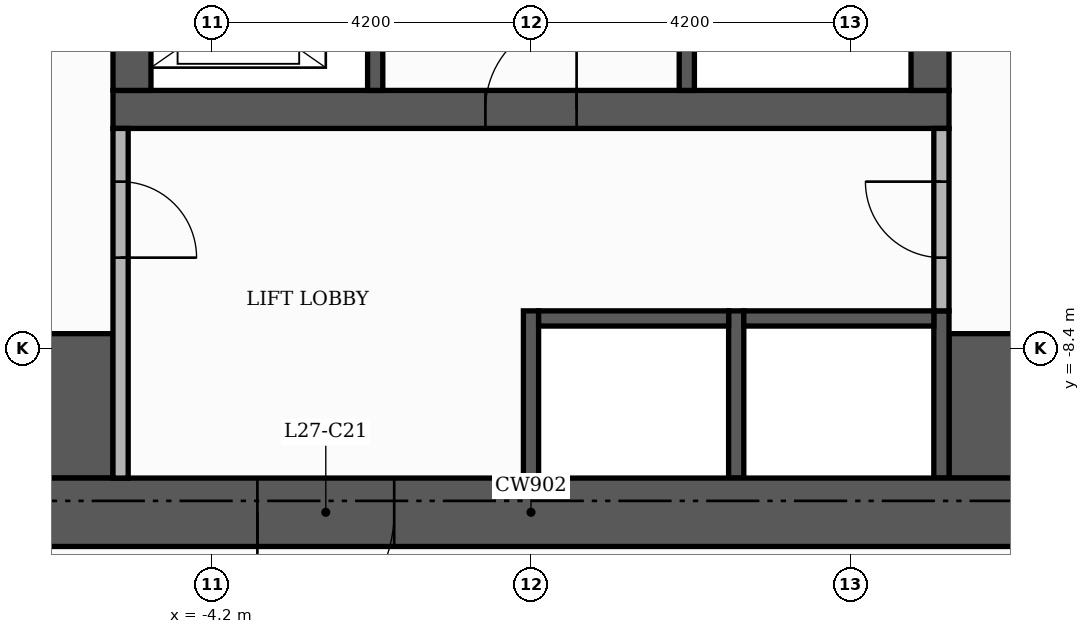
"""IFC4 building model, lengths in metres.
Left out: names, types, materials, properties, quantities, classifications, styles, units other than length and angle.
Written with IfcOpenShell. Run it as: python <this file> out.ifc"""

import sys

from ifc_helpers import new_model, si_unit, direction, frame, frame_2d, origin, place, context, subcontext, project, spatial, rectangle, extrude, element, fill, save


model = new_model("IFC4")
c1 = context("Model", 3, precision=1e-05, world=origin(), true_north=direction((0.0, 1.0)))
c2 = subcontext(c1, "Body", "Model", "MODEL_VIEW")
j1 = project(units=[si_unit("LENGTHUNIT", "METRE"), si_unit("PLANEANGLEUNIT", "RADIAN")], contexts=[c1])
p1 = place(None, origin())
s1 = spatial("IfcSite", under=j1, at=p1, CompositionType="ELEMENT")
p2 = place(p1, origin())
s2 = spatial("IfcBuilding", under=s1, at=p2, CompositionType="ELEMENT")
p3 = place(p2, frame((0.0, 0.0, 114.3)))
s3 = spatial("IfcBuildingStorey", under=s2, at=p3, CompositionType="ELEMENT", Elevation=114.3)
p4 = place(p3, frame((-5.5, -5.25, 0.0), z_axis=(0.0, 0.0, 1.0), x_axis=(1.0, 0.0, 0.0)))
e1 = element("IfcWall", 1, at=p4, inside=s3, PredefinedType="SHEAR", context=c2, shape_type="SweptSolid", body=[
    extrude(rectangle(XDim=11.0, YDim=0.5, at=frame_2d((5.5, 0.0))), origin(), (0.0, 0.0, 1.0), 3.48),
])
p5 = place(p4, frame((4.9, 0.0, 0.0)))
e2 = element("IfcOpeningElement", 2, at=p5, cuts=e1, PredefinedType="OPENING", context=c2, shape_type="SweptSolid", body=[
    extrude(rectangle(XDim=1.2, YDim=2.1, at=frame_2d((0.6, 1.05))), frame((0.0, 0.26, 0.0), z_axis=(0.0, -1.0, 0.0), x_axis=(1.0, 0.0, 0.0)), (0.0, 0.0, 1.0), 0.52),
])
for number, where, z_axis, x_axis in (
    (3, (-5.25, -5.0, 0.0), (0.0, 0.0, 1.0), (0.0, 1.0, 0.0)),
    (4, (5.25, -5.0, 0.0), (0.0, 0.0, 1.0), (0.0, 1.0, 0.0)),
):
    element("IfcWall", number, at=place(p3, frame(where, z_axis=z_axis, x_axis=x_axis)), inside=s3, PredefinedType="SHEAR", context=c2, shape_type="SweptSolid", body=[
        extrude(rectangle(XDim=10.5, YDim=0.5, at=frame_2d((5.25, 0.0))), origin(), (0.0, 0.0, 1.0), 3.48),
    ])
for number, where, z_axis, x_axis in (
    (5, (-10.1, -9.15, 0.0), (0.0, 0.0, 1.0), (1.0, 0.0, 0.0)),
    (6, (5.5, -9.15, 0.0), (0.0, 0.0, 1.0), (1.0, 0.0, 0.0)),
):
    element("IfcWall", number, at=place(p3, frame(where, z_axis=z_axis, x_axis=x_axis)), inside=s3, PredefinedType="SHEAR", context=c2, shape_type="SweptSolid", body=[
        extrude(rectangle(XDim=4.6, YDim=1.9, at=frame_2d((2.3, 0.0))), origin(), (0.0, 0.0, 1.0), 3.48),
    ])
p6 = place(p3, frame((2.05, -5.0, 0.0), z_axis=(0.0, 0.0, 1.0), x_axis=(0.0, 1.0, 0.0)))
e7 = element("IfcWall", 7, at=p6, inside=s3, PredefinedType="SHEAR", context=c2, shape_type="SweptSolid", body=[
    extrude(rectangle(XDim=6.6, YDim=0.2, at=frame_2d((3.3, 0.0))), origin(), (0.0, 0.0, 1.0), 3.48),
])
p7 = place(p6, frame((5.25, 0.0, 0.0)))
e8 = element("IfcOpeningElement", 8, at=p7, cuts=e7, PredefinedType="OPENING", context=c2, shape_type="SweptSolid", body=[
    extrude(rectangle(XDim=1.0, YDim=2.1, at=frame_2d((0.5, 1.05))), frame((0.0, 0.11, 0.0), z_axis=(0.0, -1.0, 0.0), x_axis=(1.0, 0.0, 0.0)), (0.0, 0.0, 1.0), 0.22),
])
for number, where, z_axis, x_axis in (
    (9, (0.0, -10.1, 0.0), (0.0, 0.0, 1.0), (0.0, 1.0, 0.0)),
    (10, (2.7, -10.1, 0.0), (0.0, 0.0, 1.0), (0.0, 1.0, 0.0)),
    (11, (5.4, -10.1, 0.0), (0.0, 0.0, 1.0), (0.0, 1.0, 0.0)),
):
    element("IfcWall", number, at=place(p3, frame(where, z_axis=z_axis, x_axis=x_axis)), inside=s3, PredefinedType="SHEAR", context=c2, shape_type="SweptSolid", body=[
        extrude(rectangle(XDim=2.2, YDim=0.2, at=frame_2d((1.1, 0.0))), origin(), (0.0, 0.0, 1.0), 3.48),
    ])
for number, where, z_axis, x_axis in (
    (12, (0.1, -8.0, 0.0), (0.0, 0.0, 1.0), (1.0, 0.0, 0.0)),
    (13, (2.8, -8.0, 0.0), (0.0, 0.0, 1.0), (1.0, 0.0, 0.0)),
):
    element("IfcWall", number, at=place(p3, frame(where, z_axis=z_axis, x_axis=x_axis)), inside=s3, PredefinedType="SHEAR", context=c2, shape_type="SweptSolid", body=[
        extrude(rectangle(XDim=2.5, YDim=0.2, at=frame_2d((1.25, 0.0))), origin(), (0.0, 0.0, 1.0), 3.48),
    ])
p8 = place(p3, frame((-2.05, -5.0, 0.0), z_axis=(0.0, 0.0, 1.0), x_axis=(0.0, 1.0, 0.0)))
e14 = element("IfcWall", 14, at=p8, inside=s3, PredefinedType="SHEAR", context=c2, shape_type="SweptSolid", body=[
    extrude(rectangle(XDim=3.4, YDim=0.2, at=frame_2d((1.7, 0.0))), origin(), (0.0, 0.0, 1.0), 3.48),
])
p9 = place(p8, frame((0.55, 0.0, 0.0)))
e15 = element("IfcOpeningElement", 15, at=p9, cuts=e14, PredefinedType="OPENING", context=c2, shape_type="SweptSolid", body=[
    extrude(rectangle(XDim=1.1, YDim=2.1, at=frame_2d((0.55, 1.05))), frame((0.0, 0.11, 0.0), z_axis=(0.0, -1.0, 0.0), x_axis=(1.0, 0.0, 0.0)), (0.0, 0.0, 1.0), 0.22),
])
p10 = place(p8, frame((2.45, 0.0, 0.0)))
e16 = element("IfcOpeningElement", 16, at=p10, cuts=e14, PredefinedType="OPENING", context=c2, shape_type="SweptSolid", body=[
    extrude(rectangle(XDim=0.8, YDim=2.1, at=frame_2d((0.4, 1.05))), frame((0.0, 0.11, 0.0), z_axis=(0.0, -1.0, 0.0), x_axis=(1.0, 0.0, 0.0)), (0.0, 0.0, 1.0), 0.22),
])
p11 = place(p3, frame((-11.0, -10.55, 0.0), z_axis=(0.0, 0.0, 1.0), x_axis=(1.0, 0.0, 0.0)))
e17 = element("IfcWall", 17, at=p11, inside=s3, PredefinedType="SHEAR", context=c2, shape_type="SweptSolid", body=[
    extrude(rectangle(XDim=22.0, YDim=0.9, at=frame_2d((11.0, 0.0))), origin(), (0.0, 0.0, 1.0), 3.48),
])
p12 = place(p11, frame((7.4, 0.0, 0.0)))
e18 = element("IfcOpeningElement", 18, at=p12, cuts=e17, PredefinedType="OPENING", context=c2, shape_type="SweptSolid", body=[
    extrude(rectangle(XDim=1.8, YDim=2.2, at=frame_2d((0.9, 1.1))), frame((0.0, 0.46, 0.0), z_axis=(0.0, -1.0, 0.0), x_axis=(1.0, 0.0, 0.0)), (0.0, 0.0, 1.0), 0.92),
])
p13 = place(p3, frame((-5.4, -10.1, 0.0), z_axis=(0.0, 0.0, 1.0), x_axis=(0.0, 1.0, 0.0)))
e19 = element("IfcWall", 19, at=p13, inside=s3, PredefinedType="PARTITIONING", context=c2, shape_type="SweptSolid", body=[
    extrude(rectangle(XDim=4.6, YDim=0.2, at=frame_2d((2.3, 0.0))), origin(), (0.0, 0.0, 1.0), 3.48),
])
p14 = place(p13, frame((2.9, 0.0, 0.0)))
e20 = element("IfcOpeningElement", 20, at=p14, cuts=e19, PredefinedType="OPENING", context=c2, shape_type="SweptSolid", body=[
    extrude(rectangle(XDim=1.0, YDim=2.1, at=frame_2d((0.5, 1.05))), frame((0.0, 0.11, 0.0), z_axis=(0.0, -1.0, 0.0), x_axis=(1.0, 0.0, 0.0)), (0.0, 0.0, 1.0), 0.22),
])
p15 = place(p3, frame((5.4, -7.9, 0.0), z_axis=(0.0, 0.0, 1.0), x_axis=(0.0, 1.0, 0.0)))
e21 = element("IfcWall", 21, at=p15, inside=s3, PredefinedType="PARTITIONING", context=c2, shape_type="SweptSolid", body=[
    extrude(rectangle(XDim=2.4, YDim=0.2, at=frame_2d((1.2, 0.0))), origin(), (0.0, 0.0, 1.0), 3.48),
])
p16 = place(p15, frame((0.7, 0.0, 0.0)))
e22 = element("IfcOpeningElement", 22, at=p16, cuts=e21, PredefinedType="OPENING", context=c2, shape_type="SweptSolid", body=[
    extrude(rectangle(XDim=1.0, YDim=2.1, at=frame_2d((0.5, 1.05))), frame((0.0, 0.11, 0.0), z_axis=(0.0, -1.0, 0.0), x_axis=(1.0, 0.0, 0.0)), (0.0, 0.0, 1.0), 0.22),
])
p17 = place(p5, origin())
e23 = element("IfcDoor", 23, at=p17, inside=s3, OperationType="SINGLE_SWING_RIGHT", PredefinedType="DOOR", context=c2, shape_type="SweptSolid", body=[
    extrude(rectangle(XDim=1.2, YDim=2.1, at=frame_2d((0.6, 1.05))), frame((0.0, 0.025, 0.0), z_axis=(0.0, -1.0, 0.0), x_axis=(1.0, 0.0, 0.0)), (0.0, 0.0, 1.0), 0.05),
])
fill(e2, e23)
p18 = place(p14, frame((1.0, 0.0, 0.0), z_axis=(0.0, 0.0, 1.0), x_axis=(-1.0, 0.0, 0.0)))
e24 = element("IfcDoor", 24, at=p18, inside=s3, OperationType="SINGLE_SWING_LEFT", PredefinedType="DOOR", context=c2, shape_type="SweptSolid", body=[
    extrude(rectangle(XDim=1.0, YDim=2.1, at=frame_2d((0.5, 1.05))), frame((0.0, 0.025, 0.0), z_axis=(0.0, -1.0, 0.0), x_axis=(1.0, 0.0, 0.0)), (0.0, 0.0, 1.0), 0.05),
])
fill(e20, e24)
p19 = place(p16, origin())
e25 = element("IfcDoor", 25, at=p19, inside=s3, OperationType="SINGLE_SWING_RIGHT", PredefinedType="DOOR", context=c2, shape_type="SweptSolid", body=[
    extrude(rectangle(XDim=1.0, YDim=2.1, at=frame_2d((0.5, 1.05))), frame((0.0, 0.025, 0.0), z_axis=(0.0, -1.0, 0.0), x_axis=(1.0, 0.0, 0.0)), (0.0, 0.0, 1.0), 0.05),
])
fill(e22, e25)
p20 = place(p12, frame((1.8, 0.0, 0.0), z_axis=(0.0, 0.0, 1.0), x_axis=(-1.0, 0.0, 0.0)))
e26 = element("IfcDoor", 26, at=p20, inside=s3, OperationType="DOUBLE_DOOR_SINGLE_SWING", PredefinedType="DOOR", context=c2, shape_type="SweptSolid", body=[
    extrude(rectangle(XDim=1.8, YDim=2.2, at=frame_2d((0.9, 1.1))), frame((0.0, 0.025, 0.0), z_axis=(0.0, -1.0, 0.0), x_axis=(1.0, 0.0, 0.0)), (0.0, 0.0, 1.0), 0.05),
])
fill(e18, e26)
save(model, sys.argv[1])
